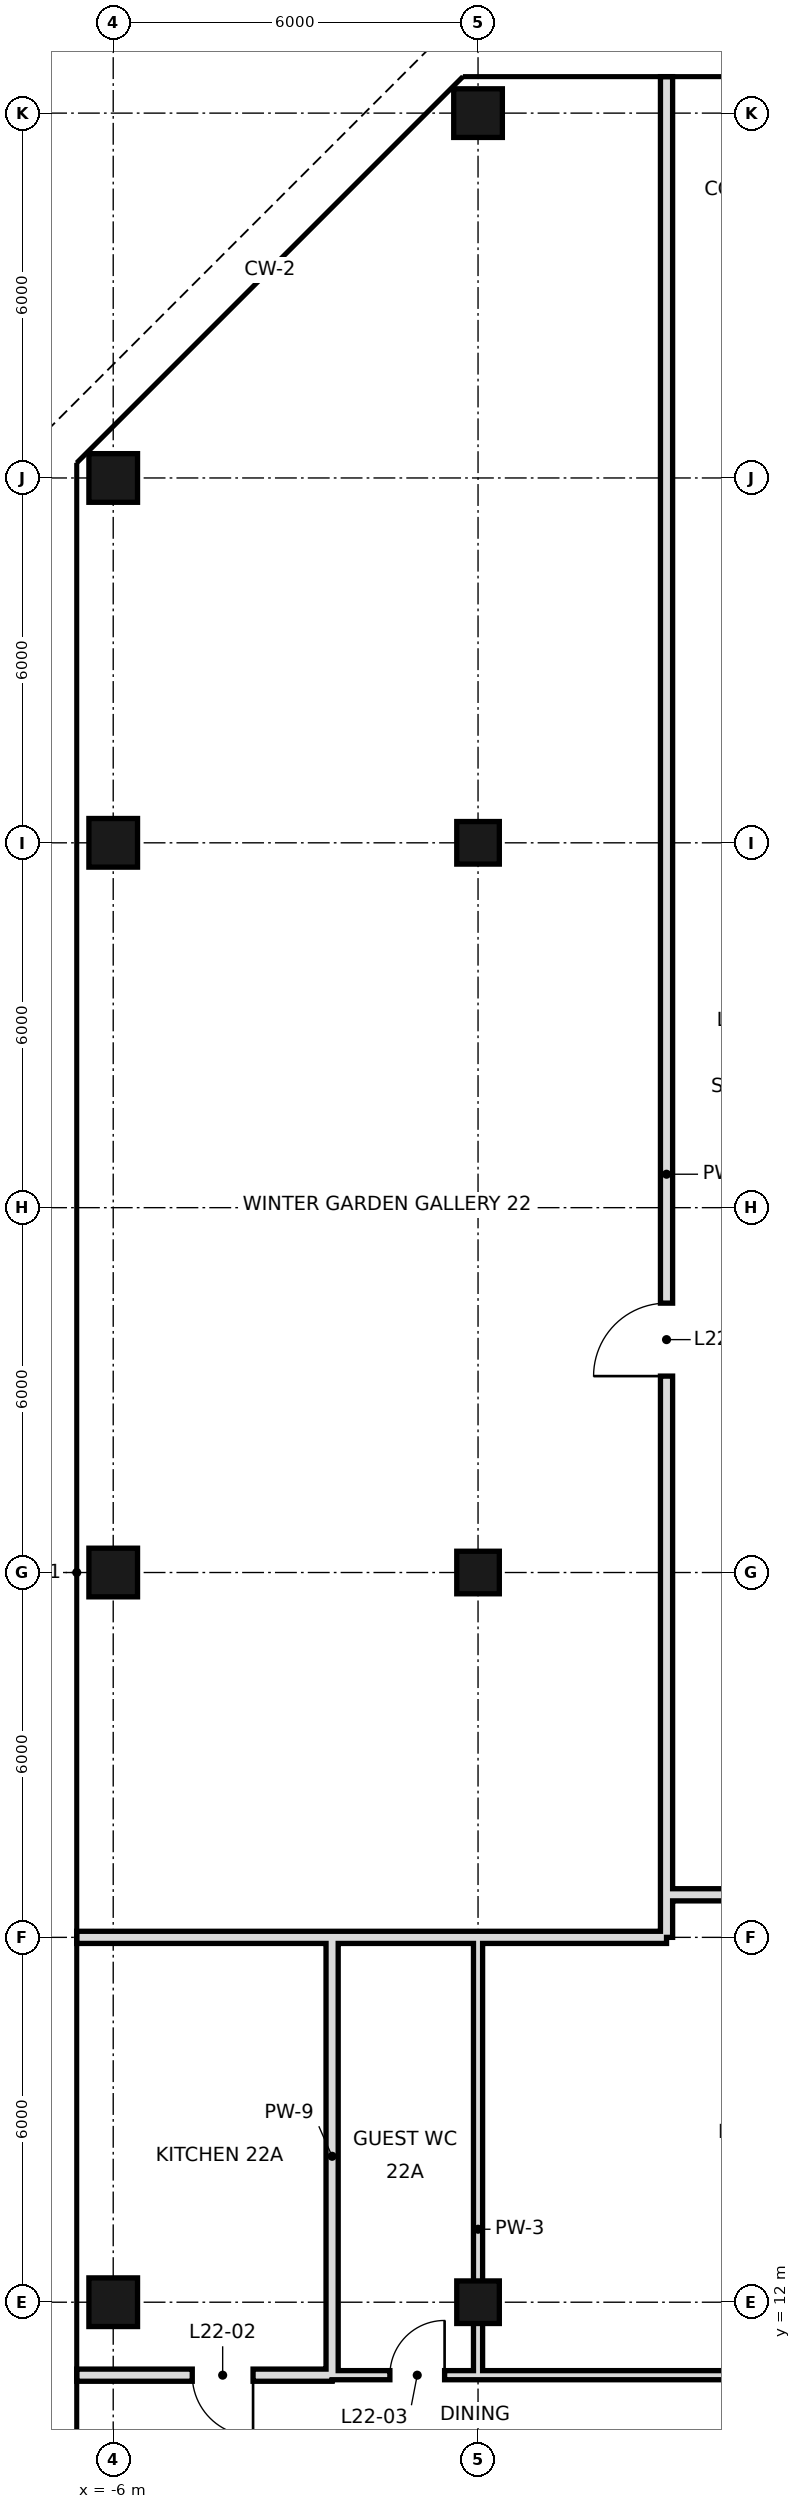
"""IFC4 building model, lengths in metres.
Left out: names, types, materials, properties, quantities, classifications, styles, units other than length and angle.
Written with IfcOpenShell. Run it as: python <this file> out.ifc"""

import sys

from ifc_helpers import new_model, si_unit, direction, frame, frame_2d, origin, origin_2d, place, context, subcontext, project, spatial, rectangle, hollow_rectangle, extrude, element, fill, save


model = new_model("IFC4")
c1 = context("Model", 3, precision=1e-05, world=origin(), true_north=direction((0.0, 1.0)))
c2 = subcontext(c1, "Body", "Model", "MODEL_VIEW")
j1 = project(units=[si_unit("LENGTHUNIT", "METRE"), si_unit("PLANEANGLEUNIT", "RADIAN")], contexts=[c1])
p1 = place(None, origin())
s1 = spatial("IfcSite", under=j1, at=p1, CompositionType="ELEMENT")
p2 = place(p1, origin())
s2 = spatial("IfcBuilding", under=s1, at=p2, CompositionType="ELEMENT")
p3 = place(p2, frame((0.0, 0.0, 103.4)))
s3 = spatial("IfcBuildingStorey", under=s2, at=p3, CompositionType="ELEMENT", Elevation=103.4)
for number, where, z_axis, x_axis in (
    (1, (-6.0, 12.0, 0.0), (0.0, 0.0, 1.0), (1.0, 0.0, 0.0)),
    (2, (-6.0, 24.0, 0.0), (0.0, 0.0, 1.0), (1.0, 0.0, 0.0)),
    (3, (-6.0, 36.0, 0.0), (0.0, 0.0, 1.0), (1.0, 0.0, 0.0)),
    (4, (-6.0, 42.0, 0.0), (0.0, 0.0, 1.0), (1.0, 0.0, 0.0)),
):
    element("IfcColumn", number, at=place(p3, frame(where, z_axis=z_axis, x_axis=x_axis)), inside=s3, PredefinedType="COLUMN", context=c2, shape_type="SweptSolid", body=[
        extrude(hollow_rectangle(XDim=0.8, YDim=0.8, WallThickness=0.04, at=origin_2d()), origin(), (0.0, 0.0, 1.0), 3.6),
    ])
for number, where, z_axis, x_axis in (
    (5, (0.0, 12.0, 0.0), (0.0, 0.0, 1.0), (1.0, 0.0, 0.0)),
    (6, (0.0, 24.0, 0.0), (0.0, 0.0, 1.0), (1.0, 0.0, 0.0)),
    (7, (0.0, 36.0, 0.0), (0.0, 0.0, 1.0), (1.0, 0.0, 0.0)),
):
    element("IfcColumn", number, at=place(p3, frame(where, z_axis=z_axis, x_axis=x_axis)), inside=s3, PredefinedType="COLUMN", context=c2, shape_type="SweptSolid", body=[
        extrude(hollow_rectangle(XDim=0.7, YDim=0.7, WallThickness=0.036, at=origin_2d()), origin(), (0.0, 0.0, 1.0), 3.6),
    ])
p4 = place(p3, frame((0.0, 48.0, 0.0), z_axis=(0.0, 0.0, 1.0), x_axis=(1.0, 0.0, 0.0)))
e8 = element("IfcColumn", 8, at=p4, inside=s3, PredefinedType="COLUMN", context=c2, shape_type="SweptSolid", body=[
    extrude(hollow_rectangle(XDim=0.8, YDim=0.8, WallThickness=0.04, at=origin_2d()), origin(), (0.0, 0.0, 1.0), 3.6),
])
p5 = place(p3, frame((-2.4, 10.8, 0.0), z_axis=(0.0, 0.0, 1.0), x_axis=(0.0, 1.0, 0.0)))
e9 = element("IfcWall", 9, at=p5, inside=s3, PredefinedType="SOLIDWALL", context=c2, shape_type="SweptSolid", body=[
    extrude(rectangle(XDim=7.2, YDim=0.2, at=frame_2d((3.6, 0.0))), origin(), (0.0, 0.0, 1.0), 2.97),
])
p6 = place(p3, frame((0.0, 10.8, 0.0), z_axis=(0.0, 0.0, 1.0), x_axis=(0.0, 1.0, 0.0)))
e10 = element("IfcWall", 10, at=p6, inside=s3, PredefinedType="PARTITIONING", context=c2, shape_type="SweptSolid", body=[
    extrude(rectangle(XDim=7.2, YDim=0.15, at=frame_2d((3.6, 0.0))), origin(), (0.0, 0.0, 1.0), 2.72),
])
p7 = place(p3, frame((3.1, 18.0, 0.0), z_axis=(0.0, 0.0, 1.0), x_axis=(0.0, 1.0, 0.0)))
e11 = element("IfcWall", 11, at=p7, inside=s3, PredefinedType="SOLIDWALL", context=c2, shape_type="SweptSolid", body=[
    extrude(rectangle(XDim=30.6, YDim=0.2, at=frame_2d((15.3, 0.0))), origin(), (0.0, 0.0, 1.0), 2.72),
])
p8 = place(p7, frame((9.23, 0.0, 0.0)))
e12 = element("IfcOpeningElement", 12, at=p8, cuts=e11, PredefinedType="OPENING", context=c2, shape_type="SweptSolid", body=[
    extrude(rectangle(XDim=1.2, YDim=2.4, at=frame_2d((0.6, 1.2))), frame((0.0, 0.11, 0.0), z_axis=(0.0, -1.0, 0.0), x_axis=(1.0, 0.0, 0.0)), (0.0, 0.0, 1.0), 0.22),
])
p9 = place(p3, frame((-6.6, 10.8, 0.0), z_axis=(0.0, 0.0, 1.0), x_axis=(1.0, 0.0, 0.0)))
e13 = element("IfcWall", 13, at=p9, inside=s3, PredefinedType="SOLIDWALL", context=c2, shape_type="SweptSolid", body=[
    extrude(rectangle(XDim=4.2, YDim=0.2, at=frame_2d((2.1, 0.0))), origin(), (0.0, 0.0, 1.0), 2.97),
])
p10 = place(p9, frame((1.9, 0.0, 0.0)))
e14 = element("IfcOpeningElement", 14, at=p10, cuts=e13, PredefinedType="OPENING", context=c2, shape_type="SweptSolid", body=[
    extrude(rectangle(XDim=1.0, YDim=2.4, at=frame_2d((0.5, 1.2))), frame((0.0, 0.11, 0.0), z_axis=(0.0, -1.0, 0.0), x_axis=(1.0, 0.0, 0.0)), (0.0, 0.0, 1.0), 0.22),
])
p11 = place(p3, frame((0.0, 10.8, 0.0), z_axis=(0.0, 0.0, 1.0), x_axis=(1.0, 0.0, 0.0)))
e15 = element("IfcWall", 15, at=p11, inside=s3, PredefinedType="PARTITIONING", context=c2, shape_type="SweptSolid", body=[
    extrude(rectangle(XDim=24.0, YDim=0.15, at=frame_2d((12.0, 0.0))), origin(), (0.0, 0.0, 1.0), 3.42),
])
p12 = place(p11, frame((21.28, 0.0, 0.0)))
e16 = element("IfcOpeningElement", 16, at=p12, cuts=e15, PredefinedType="OPENING", context=c2, shape_type="SweptSolid", body=[
    extrude(rectangle(XDim=1.0, YDim=2.4, at=frame_2d((0.5, 1.2))), frame((0.0, 0.085, 0.0), z_axis=(0.0, -1.0, 0.0), x_axis=(1.0, 0.0, 0.0)), (0.0, 0.0, 1.0), 0.17),
])
p13 = place(p11, frame((4.6, 0.0, 0.0)))
e17 = element("IfcOpeningElement", 17, at=p13, cuts=e15, PredefinedType="OPENING", context=c2, shape_type="SweptSolid", body=[
    extrude(rectangle(XDim=1.0, YDim=2.4, at=frame_2d((0.5, 1.2))), frame((0.0, 0.085, 0.0), z_axis=(0.0, -1.0, 0.0), x_axis=(1.0, 0.0, 0.0)), (0.0, 0.0, 1.0), 0.17),
])
p14 = place(p11, frame((13.06, 0.0, 0.0)))
e18 = element("IfcOpeningElement", 18, at=p14, cuts=e15, PredefinedType="OPENING", context=c2, shape_type="SweptSolid", body=[
    extrude(rectangle(XDim=1.0, YDim=2.4, at=frame_2d((0.5, 1.2))), frame((0.0, 0.085, 0.0), z_axis=(0.0, -1.0, 0.0), x_axis=(1.0, 0.0, 0.0)), (0.0, 0.0, 1.0), 0.17),
])
p15 = place(p3, frame((-2.4, 10.8, 0.0), z_axis=(0.0, 0.0, 1.0), x_axis=(1.0, 0.0, 0.0)))
e19 = element("IfcWall", 19, at=p15, inside=s3, PredefinedType="PARTITIONING", context=c2, shape_type="SweptSolid", body=[
    extrude(rectangle(XDim=2.4, YDim=0.15, at=frame_2d((1.2, 0.0))), origin(), (0.0, 0.0, 1.0), 3.42),
])
p16 = place(p15, frame((0.95, 0.0, 0.0)))
e20 = element("IfcOpeningElement", 20, at=p16, cuts=e19, PredefinedType="OPENING", context=c2, shape_type="SweptSolid", body=[
    extrude(rectangle(XDim=0.9, YDim=2.4, at=frame_2d((0.45, 1.2))), frame((0.0, 0.085, 0.0), z_axis=(0.0, -1.0, 0.0), x_axis=(1.0, 0.0, 0.0)), (0.0, 0.0, 1.0), 0.17),
])
p17 = place(p3, frame((-2.4, 18.0, 0.0), z_axis=(0.0, 0.0, 1.0), x_axis=(1.0, 0.0, 0.0)))
e21 = element("IfcWall", 21, at=p17, inside=s3, PredefinedType="SOLIDWALL", context=c2, shape_type="SweptSolid", body=[
    extrude(rectangle(XDim=5.5, YDim=0.2, at=frame_2d((2.75, 0.0))), origin(), (0.0, 0.0, 1.0), 2.72),
])
p18 = place(p3, frame((-6.6, 18.0, 0.0), z_axis=(0.0, 0.0, 1.0), x_axis=(1.0, 0.0, 0.0)))
e22 = element("IfcWall", 22, at=p18, inside=s3, PredefinedType="SOLIDWALL", context=c2, shape_type="SweptSolid", body=[
    extrude(rectangle(XDim=4.2, YDim=0.2, at=frame_2d((2.1, 0.0))), origin(), (0.0, 0.0, 1.0), 2.72),
])
p19 = place(p3, frame((3.1, 18.7, 0.0), z_axis=(0.0, 0.0, 1.0), x_axis=(1.0, 0.0, 0.0)))
e23 = element("IfcWall", 23, at=p19, inside=s3, PredefinedType="SOLIDWALL", context=c2, shape_type="SweptSolid", body=[
    extrude(rectangle(XDim=41.8, YDim=0.2, at=frame_2d((20.9, 0.0))), origin(), (0.0, 0.0, 1.0), 2.72),
])
p20 = place(p19, frame((18.12, 0.0, 0.0)))
e24 = element("IfcOpeningElement", 24, at=p20, cuts=e23, PredefinedType="OPENING", context=c2, shape_type="SweptSolid", body=[
    extrude(rectangle(XDim=1.2, YDim=2.4, at=frame_2d((0.6, 1.2))), frame((0.0, 0.11, 0.0), z_axis=(0.0, -1.0, 0.0), x_axis=(1.0, 0.0, 0.0)), (0.0, 0.0, 1.0), 0.22),
])
p21 = place(p19, frame((26.73, 0.0, 0.0)))
e25 = element("IfcOpeningElement", 25, at=p21, cuts=e23, PredefinedType="OPENING", context=c2, shape_type="SweptSolid", body=[
    extrude(rectangle(XDim=1.8, YDim=2.4, at=frame_2d((0.9, 1.2))), frame((0.0, 0.11, 0.0), z_axis=(0.0, -1.0, 0.0), x_axis=(1.0, 0.0, 0.0)), (0.0, 0.0, 1.0), 0.22),
])
p22 = place(p10, origin())
e26 = element("IfcDoor", 26, at=p22, inside=s3, OperationType="SINGLE_SWING_RIGHT", PredefinedType="DOOR", context=c2, shape_type="SweptSolid", body=[
    extrude(rectangle(XDim=1.0, YDim=2.4, at=frame_2d((0.5, 1.2))), frame((0.0, 0.025, 0.0), z_axis=(0.0, -1.0, 0.0), x_axis=(1.0, 0.0, 0.0)), (0.0, 0.0, 1.0), 0.05),
])
fill(e14, e26)
p23 = place(p16, frame((0.9, 0.0, 0.0), z_axis=(0.0, 0.0, 1.0), x_axis=(-1.0, 0.0, 0.0)))
e27 = element("IfcDoor", 27, at=p23, inside=s3, OperationType="SINGLE_SWING_LEFT", PredefinedType="DOOR", context=c2, shape_type="SweptSolid", body=[
    extrude(rectangle(XDim=0.9, YDim=2.4, at=frame_2d((0.45, 1.2))), frame((0.0, 0.025, 0.0), z_axis=(0.0, -1.0, 0.0), x_axis=(1.0, 0.0, 0.0)), (0.0, 0.0, 1.0), 0.05),
])
fill(e20, e27)
p24 = place(p8, origin())
e28 = element("IfcDoor", 28, at=p24, inside=s3, OperationType="SINGLE_SWING_LEFT", PredefinedType="DOOR", context=c2, shape_type="SweptSolid", body=[
    extrude(rectangle(XDim=1.2, YDim=2.4, at=frame_2d((0.6, 1.2))), frame((0.0, 0.025, 0.0), z_axis=(0.0, -1.0, 0.0), x_axis=(1.0, 0.0, 0.0)), (0.0, 0.0, 1.0), 0.05),
])
fill(e12, e28)
save(model, sys.argv[1])
